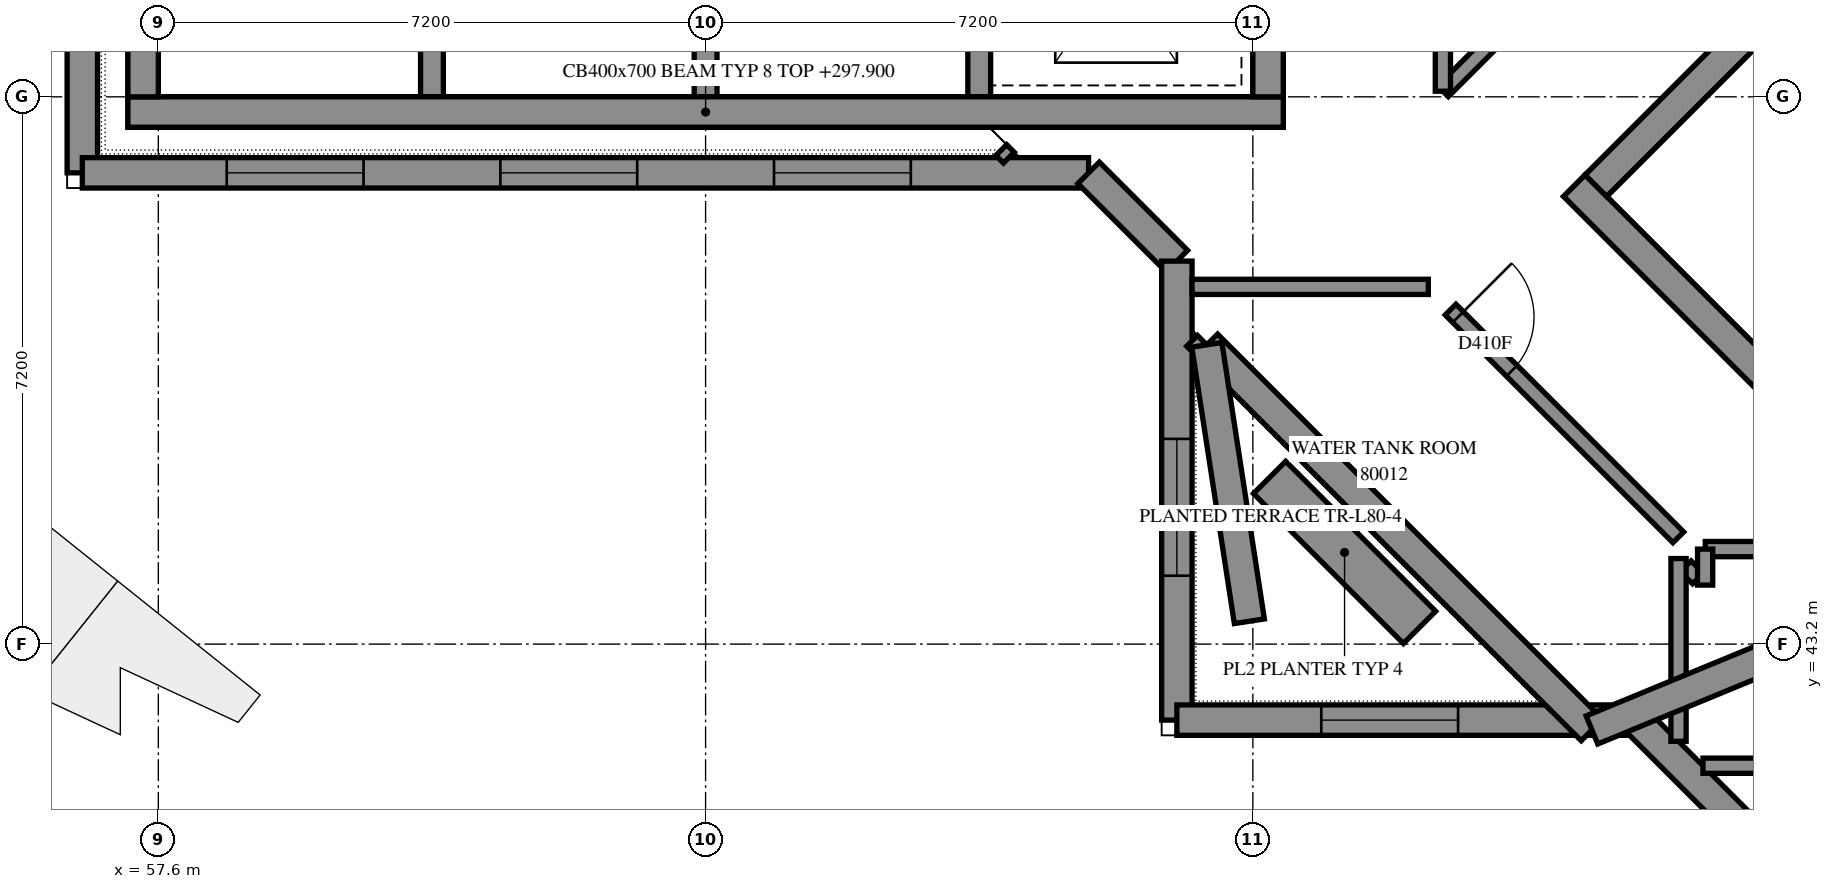
"""IFC4 building model, lengths in metres.
Left out: names, types, materials, properties, quantities, classifications, styles, units other than length and angle.
Written with IfcOpenShell. Run it as: python <this file> out.ifc"""

import sys

from ifc_helpers import new_model, si_unit, direction, frame, frame_2d, origin, place, context, subcontext, project, spatial, polyline, rectangle, outline, extrude, element, fill, save


model = new_model("IFC4")
c1 = context("Model", 3, precision=1e-05, world=origin(), true_north=direction((0.0, 1.0)))
c2 = subcontext(c1, "Body", "Model", "MODEL_VIEW")
j1 = project(units=[si_unit("LENGTHUNIT", "METRE"), si_unit("PLANEANGLEUNIT", "RADIAN")], contexts=[c1])
p1 = place(None, origin())
s1 = spatial("IfcSite", under=j1, at=p1, CompositionType="ELEMENT")
p2 = place(p1, origin())
s2 = spatial("IfcBuilding", under=s1, at=p2, CompositionType="ELEMENT")
p3 = place(p2, frame((0.0, 0.0, 294.4)))
s3 = spatial("IfcBuildingStorey", under=s2, at=p3, CompositionType="ELEMENT", Elevation=294.4)
p4 = place(p3, frame((57.2, 50.2, -0.3), z_axis=(0.0, 0.0, 1.0), x_axis=(1.0, 0.0, 0.0)))
e1 = element("IfcWall", 1, at=p4, inside=s3, PredefinedType="SHEAR", context=c2, shape_type="SweptSolid", body=[
    extrude(outline(polyline([(0.0, 0.0), (15.2, 0.0), (15.2, 3.1), (0.0, 3.1), (0.0, 0.0)])), frame((0.0, 0.2, 0.0), z_axis=(0.0, -1.0, 0.0), x_axis=(1.0, 0.0, 0.0)), (0.0, 0.0, 1.0), 0.4),
])
p5 = place(p3, frame((57.4, 50.4, -0.3), z_axis=(0.0, 0.0, 1.0), x_axis=(0.0, 1.0, 0.0)))
e2 = element("IfcWall", 2, at=p5, inside=s3, PredefinedType="SHEAR", context=c2, shape_type="SweptSolid", body=[
    extrude(outline(polyline([(0.0, 0.0), (14.4, 0.0), (14.4, 3.1), (0.0, 3.1), (0.0, 0.0)])), frame((0.0, 0.2, 0.0), z_axis=(0.0, -1.0, 0.0), x_axis=(1.0, 0.0, 0.0)), (0.0, 0.0, 1.0), 0.4),
])
p6 = place(p5, frame((11.35, 0.0, 0.3)))
e3 = element("IfcOpeningElement", 3, at=p6, cuts=e2, PredefinedType="OPENING", context=c2, shape_type="SweptSolid", body=[
    extrude(rectangle(XDim=1.1, YDim=2.1, at=frame_2d((0.55, 1.05))), frame((0.0, 0.21, 0.0), z_axis=(0.0, -1.0, 0.0), x_axis=(1.0, 0.0, 0.0)), (0.0, 0.0, 1.0), 0.42),
])
p7 = place(p3, frame((72.2, 50.4, -0.3), z_axis=(0.0, 0.0, 1.0), x_axis=(0.0, 1.0, 0.0)))
e4 = element("IfcWall", 4, at=p7, inside=s3, PredefinedType="SHEAR", context=c2, shape_type="SweptSolid", body=[
    extrude(outline(polyline([(0.0, 0.0), (14.4, 0.0), (14.4, 3.1), (0.0, 3.1), (0.0, 0.0)])), frame((0.0, 0.2, 0.0), z_axis=(0.0, -1.0, 0.0), x_axis=(1.0, 0.0, 0.0)), (0.0, 0.0, 1.0), 0.4),
])
p8 = place(p7, frame((4.55, 0.0, 0.3)))
e5 = element("IfcOpeningElement", 5, at=p8, cuts=e4, PredefinedType="OPENING", context=c2, shape_type="SweptSolid", body=[
    extrude(rectangle(XDim=1.1, YDim=2.1, at=frame_2d((0.55, 1.05))), frame((0.0, 0.21, 0.0), z_axis=(0.0, -1.0, 0.0), x_axis=(1.0, 0.0, 0.0)), (0.0, 0.0, 1.0), 0.42),
])
p9 = place(p7, frame((11.35, 0.0, 0.3)))
e6 = element("IfcOpeningElement", 6, at=p9, cuts=e4, PredefinedType="OPENING", context=c2, shape_type="SweptSolid", body=[
    extrude(rectangle(XDim=1.1, YDim=2.1, at=frame_2d((0.55, 1.05))), frame((0.0, 0.21, 0.0), z_axis=(0.0, -1.0, 0.0), x_axis=(1.0, 0.0, 0.0)), (0.0, 0.0, 1.0), 0.42),
])
for number, where, z_axis, x_axis in (
    (7, (61.2, 50.4, 0.0), (0.0, 0.0, 1.0), (0.0, 1.0, 0.0)),
    (8, (64.8, 50.4, 0.0), (0.0, 0.0, 1.0), (0.0, 1.0, 0.0)),
    (9, (68.4, 50.4, 0.0), (0.0, 0.0, 1.0), (0.0, 1.0, 0.0)),
):
    element("IfcWall", number, at=place(p3, frame(where, z_axis=z_axis, x_axis=x_axis)), inside=s3, PredefinedType="SOLIDWALL", context=c2, shape_type="SweptSolid", body=[
        extrude(outline(polyline([(0.0, 0.0), (3.3, 0.0), (3.3, 3.5), (0.0, 3.5), (0.0, 0.0)])), frame((0.0, 0.15, 0.0), z_axis=(0.0, -1.0, 0.0), x_axis=(1.0, 0.0, 0.0)), (0.0, 0.0, 1.0), 0.3),
    ])
p10 = place(p3, frame((76.23, 49.231, -0.3), z_axis=(0.0, 0.0, 1.0), x_axis=(0.7071034917, -0.7071100706, 0.0)))
e10 = element("IfcWall", 10, at=p10, inside=s3, PredefinedType="SHEAR", context=c2, shape_type="SweptSolid", body=[
    extrude(outline(polyline([(0.0, 0.0), (15.2, 0.0), (15.2, 3.1), (0.0, 3.1), (0.0, 0.0)])), frame((0.0, 0.2, 0.0), z_axis=(0.0, -1.0, 0.0), x_axis=(1.0, 0.0, 0.0)), (0.0, 0.0, 1.0), 0.4),
])
p11 = place(p3, frame((76.513, 49.231, -0.3), z_axis=(0.0, 0.0, 1.0), x_axis=(0.7071067812, 0.7071067812, 0.0)))
e11 = element("IfcWall", 11, at=p11, inside=s3, PredefinedType="SHEAR", context=c2, shape_type="SweptSolid", body=[
    extrude(outline(polyline([(0.0, 0.0), (14.4, 0.0), (14.4, 3.1), (0.0, 3.1), (0.0, 0.0)])), frame((0.0, 0.2, 0.0), z_axis=(0.0, -1.0, 0.0), x_axis=(1.0, 0.0, 0.0)), (0.0, 0.0, 1.0), 0.4),
])
p12 = place(p11, frame((4.55, 0.0, 0.3)))
e12 = element("IfcOpeningElement", 12, at=p12, cuts=e11, PredefinedType="OPENING", context=c2, shape_type="SweptSolid", body=[
    extrude(rectangle(XDim=1.1, YDim=2.1, at=frame_2d((0.55, 1.05))), frame((0.0, 0.21, 0.0), z_axis=(0.0, -1.0, 0.0), x_axis=(1.0, 0.0, 0.0)), (0.0, 0.0, 1.0), 0.42),
])
p13 = place(p11, frame((11.35, 0.0, 0.3)))
e13 = element("IfcOpeningElement", 13, at=p13, cuts=e11, PredefinedType="OPENING", context=c2, shape_type="SweptSolid", body=[
    extrude(rectangle(XDim=1.1, YDim=2.1, at=frame_2d((0.55, 1.05))), frame((0.0, 0.21, 0.0), z_axis=(0.0, -1.0, 0.0), x_axis=(1.0, 0.0, 0.0)), (0.0, 0.0, 1.0), 0.42),
])
p14 = place(p3, frame((56.6, 56.6, 0.0), z_axis=(0.0, 0.0, 1.0), x_axis=(0.0, -1.0, 0.0)))
e14 = element("IfcWall", 14, at=p14, inside=s3, PredefinedType="SOLIDWALL", context=c2, shape_type="SweptSolid", body=[
    extrude(outline(polyline([(-0.2, -0.2), (7.4, -0.2), (7.0, 0.2), (-0.2, 0.2), (-0.2, -0.2)])), origin(), (0.0, 0.0, 1.0), 3.5),
])
p15 = place(p14, frame((0.5, 0.0, 0.7)))
e15 = element("IfcOpeningElement", 15, at=p15, cuts=e14, PredefinedType="OPENING", context=c2, shape_type="SweptSolid", body=[
    extrude(rectangle(XDim=1.8, YDim=2.2, at=frame_2d((0.9, 1.1))), frame((0.0, 0.21, 0.0), z_axis=(0.0, -1.0, 0.0), x_axis=(1.0, 0.0, 0.0)), (0.0, 0.0, 1.0), 0.42),
])
p16 = place(p14, frame((3.5, 0.0, 0.7)))
e16 = element("IfcOpeningElement", 16, at=p16, cuts=e14, PredefinedType="OPENING", context=c2, shape_type="SweptSolid", body=[
    extrude(rectangle(XDim=1.8, YDim=2.2, at=frame_2d((0.9, 1.1))), frame((0.0, 0.21, 0.0), z_axis=(0.0, -1.0, 0.0), x_axis=(1.0, 0.0, 0.0)), (0.0, 0.0, 1.0), 0.42),
])
p17 = place(p3, frame((56.6, 49.4, 0.0), z_axis=(0.0, 0.0, 1.0), x_axis=(1.0, 0.0, 0.0)))
e17 = element("IfcWall", 17, at=p17, inside=s3, PredefinedType="SOLIDWALL", context=c2, shape_type="SweptSolid", body=[
    extrude(outline(polyline([(-0.2, -0.2), (13.156, -0.2), (13.322, 0.2), (0.2, 0.2), (-0.2, -0.2)])), origin(), (0.0, 0.0, 1.0), 3.5),
])
p18 = place(p17, frame((1.9, 0.0, 0.7)))
e18 = element("IfcOpeningElement", 18, at=p18, cuts=e17, PredefinedType="OPENING", context=c2, shape_type="SweptSolid", body=[
    extrude(rectangle(XDim=1.8, YDim=2.2, at=frame_2d((0.9, 1.1))), frame((0.0, 0.21, 0.0), z_axis=(0.0, -1.0, 0.0), x_axis=(1.0, 0.0, 0.0)), (0.0, 0.0, 1.0), 0.42),
])
p19 = place(p17, frame((5.5, 0.0, 0.7)))
e19 = element("IfcOpeningElement", 19, at=p19, cuts=e17, PredefinedType="OPENING", context=c2, shape_type="SweptSolid", body=[
    extrude(rectangle(XDim=1.8, YDim=2.2, at=frame_2d((0.9, 1.1))), frame((0.0, 0.21, 0.0), z_axis=(0.0, -1.0, 0.0), x_axis=(1.0, 0.0, 0.0)), (0.0, 0.0, 1.0), 0.42),
])
p20 = place(p17, frame((9.1, 0.0, 0.7)))
e20 = element("IfcOpeningElement", 20, at=p20, cuts=e17, PredefinedType="OPENING", context=c2, shape_type="SweptSolid", body=[
    extrude(rectangle(XDim=1.8, YDim=2.2, at=frame_2d((0.9, 1.1))), frame((0.0, 0.21, 0.0), z_axis=(0.0, -1.0, 0.0), x_axis=(1.0, 0.0, 0.0)), (0.0, 0.0, 1.0), 0.42),
])
p21 = place(p3, frame((69.839, 49.4, 0.0), z_axis=(0.0, 0.0, 1.0), x_axis=(0.7071067812, -0.7071067812, 0.0)))
e21 = element("IfcWall", 21, at=p21, inside=s3, PredefinedType="SOLIDWALL", context=c2, shape_type="SweptSolid", body=[
    extrude(outline(polyline([(0.083, -0.2), (1.559, -0.2), (1.725, 0.2), (-0.083, 0.2), (0.083, -0.2)])), origin(), (0.0, 0.0, 1.0), 3.5),
])
p22 = place(p3, frame((71.0, 48.239, 0.0), z_axis=(0.0, 0.0, 1.0), x_axis=(0.0, -1.0, 0.0)))
e22 = element("IfcWall", 22, at=p22, inside=s3, PredefinedType="SOLIDWALL", context=c2, shape_type="SweptSolid", body=[
    extrude(outline(polyline([(0.083, -0.2), (6.239, -0.2), (5.839, 0.2), (-0.083, 0.2), (0.083, -0.2)])), origin(), (0.0, 0.0, 1.0), 3.5),
])
p23 = place(p22, frame((2.339, 0.0, 0.7)))
e23 = element("IfcOpeningElement", 23, at=p23, cuts=e22, PredefinedType="OPENING", context=c2, shape_type="SweptSolid", body=[
    extrude(rectangle(XDim=1.8, YDim=2.2, at=frame_2d((0.9, 1.1))), frame((0.0, 0.21, 0.0), z_axis=(0.0, -1.0, 0.0), x_axis=(1.0, 0.0, 0.0)), (0.0, 0.0, 1.0), 0.42),
])
p24 = place(p3, frame((71.0, 42.2, 0.0), z_axis=(0.0, 0.0, 1.0), x_axis=(1.0, 0.0, 0.0)))
e24 = element("IfcWall", 24, at=p24, inside=s3, PredefinedType="SOLIDWALL", context=c2, shape_type="SweptSolid", body=[
    extrude(outline(polyline([(-0.2, -0.2), (5.956, -0.2), (6.122, 0.2), (0.2, 0.2), (-0.2, -0.2)])), origin(), (0.0, 0.0, 1.0), 3.5),
])
p25 = place(p24, frame((1.9, 0.0, 0.7)))
e25 = element("IfcOpeningElement", 25, at=p25, cuts=e24, PredefinedType="OPENING", context=c2, shape_type="SweptSolid", body=[
    extrude(rectangle(XDim=1.8, YDim=2.2, at=frame_2d((0.9, 1.1))), frame((0.0, 0.21, 0.0), z_axis=(0.0, -1.0, 0.0), x_axis=(1.0, 0.0, 0.0)), (0.0, 0.0, 1.0), 0.42),
])
p26 = place(p3, frame((77.039, 42.2, 0.0), z_axis=(0.0, 0.0, 1.0), x_axis=(0.7071067812, -0.7071067812, 0.0)))
e26 = element("IfcWall", 26, at=p26, inside=s3, PredefinedType="SOLIDWALL", context=c2, shape_type="SweptSolid", body=[
    extrude(outline(polyline([(0.083, -0.2), (17.656, -0.2), (17.256, 0.2), (-0.083, 0.2), (0.083, -0.2)])), origin(), (0.0, 0.0, 1.0), 3.5),
])
p27 = place(p26, frame((2.857, 0.0, 0.7)))
e27 = element("IfcOpeningElement", 27, at=p27, cuts=e26, PredefinedType="OPENING", context=c2, shape_type="SweptSolid", body=[
    extrude(rectangle(XDim=1.8, YDim=2.2, at=frame_2d((0.9, 1.1))), frame((0.0, 0.21, 0.0), z_axis=(0.0, -1.0, 0.0), x_axis=(1.0, 0.0, 0.0)), (0.0, 0.0, 1.0), 0.42),
])
p28 = place(p26, frame((6.556, 0.0, 0.7)))
e28 = element("IfcOpeningElement", 28, at=p28, cuts=e26, PredefinedType="OPENING", context=c2, shape_type="SweptSolid", body=[
    extrude(rectangle(XDim=1.8, YDim=2.2, at=frame_2d((0.9, 1.1))), frame((0.0, 0.21, 0.0), z_axis=(0.0, -1.0, 0.0), x_axis=(1.0, 0.0, 0.0)), (0.0, 0.0, 1.0), 0.42),
])
p29 = place(p26, frame((10.156, 0.0, 0.7)))
e29 = element("IfcOpeningElement", 29, at=p29, cuts=e26, PredefinedType="OPENING", context=c2, shape_type="SweptSolid", body=[
    extrude(rectangle(XDim=1.8, YDim=2.2, at=frame_2d((0.9, 1.1))), frame((0.0, 0.21, 0.0), z_axis=(0.0, -1.0, 0.0), x_axis=(1.0, 0.0, 0.0)), (0.0, 0.0, 1.0), 0.42),
])
p30 = place(p26, frame((13.757, 0.0, 0.7)))
e30 = element("IfcOpeningElement", 30, at=p30, cuts=e26, PredefinedType="OPENING", context=c2, shape_type="SweptSolid", body=[
    extrude(rectangle(XDim=1.8, YDim=2.2, at=frame_2d((0.9, 1.1))), frame((0.0, 0.21, 0.0), z_axis=(0.0, -1.0, 0.0), x_axis=(1.0, 0.0, 0.0)), (0.0, 0.0, 1.0), 0.42),
])
p31 = place(p3, frame((68.79, 49.6, 0.0), z_axis=(0.0, 0.0, 1.0), x_axis=(-0.7071067812, 0.7071067812, 0.0)))
e31 = element("IfcWall", 31, at=p31, inside=s3, PredefinedType="PARAPET", context=c2, shape_type="SweptSolid", body=[
    extrude(outline(polyline([(0.0, -0.1), (0.141, -0.1), (0.141, 0.1), (0.0, 0.1), (0.0, -0.1)])), origin(), (0.0, 0.0, 1.0), 0.25),
])
p32 = place(p3, frame((75.99, 42.4, 0.0), z_axis=(0.0, 0.0, 1.0), x_axis=(-0.7071067812, 0.7071067812, 0.0)))
e32 = element("IfcWall", 32, at=p32, inside=s3, PredefinedType="PARAPET", context=c2, shape_type="SweptSolid", body=[
    extrude(outline(polyline([(0.0, -0.1), (6.774, -0.1), (6.774, 0.1), (0.0, 0.1), (0.0, -0.1)])), origin(), (0.0, 0.0, 1.0), 0.25),
])
p33 = place(p3, frame((74.601, 47.601, 0.0), z_axis=(0.0, 0.0, 1.0), x_axis=(0.7071067812, -0.7071067812, 0.0)))
e33 = element("IfcWall", 33, at=p33, inside=s3, PredefinedType="PARTITIONING", context=c2, shape_type="SweptSolid", body=[
    extrude(rectangle(XDim=4.237, YDim=0.2, at=frame_2d((2.119, 0.0))), origin(), (0.0, 0.0, 1.0), 3.5),
])
p34 = place(p33, frame((0.139, 0.0, 0.0)))
e34 = element("IfcOpeningElement", 34, at=p34, cuts=e33, PredefinedType="OPENING", context=c2, shape_type="SweptSolid", body=[
    extrude(rectangle(XDim=1.0, YDim=2.1, at=frame_2d((0.5, 1.05))), frame((0.0, 0.11, 0.0), z_axis=(0.0, -1.0, 0.0), x_axis=(1.0, 0.0, 0.0)), (0.0, 0.0, 1.0), 0.22),
])
p35 = place(p3, frame((74.501, 50.473, 0.0), z_axis=(0.0, 0.0, 1.0), x_axis=(0.7071067812, 0.7071067812, 0.0)))
e35 = element("IfcWall", 35, at=p35, inside=s3, PredefinedType="PARTITIONING", context=c2, shape_type="SweptSolid", body=[
    extrude(rectangle(XDim=3.502, YDim=0.2, at=frame_2d((1.751, 0.0))), origin(), (0.0, 0.0, 1.0), 3.5),
])
p36 = place(p3, frame((77.952, 44.45, 0.0), z_axis=(0.0, 0.0, 1.0), x_axis=(1.0, 0.0, 0.0)))
e36 = element("IfcWall", 36, at=p36, inside=s3, PredefinedType="PARTITIONING", context=c2, shape_type="SweptSolid", body=[
    extrude(rectangle(XDim=2.498, YDim=0.2, at=frame_2d((1.249, 0.0))), origin(), (0.0, 0.0, 1.0), 3.5),
])
p37 = place(p3, frame((74.5, 50.474, 0.0), z_axis=(0.0, 0.0, 1.0), x_axis=(0.0, 1.0, 0.0)))
e37 = element("IfcWall", 37, at=p37, inside=s3, PredefinedType="PARTITIONING", context=c2, shape_type="SweptSolid", body=[
    extrude(rectangle(XDim=2.476, YDim=0.2, at=frame_2d((1.238, 0.0))), origin(), (0.0, 0.0, 1.0), 3.5),
])
p38 = place(p3, frame((77.696, 44.224, 0.0), z_axis=(0.0, 0.0, 1.0), x_axis=(0.7071067812, -0.7071067812, 0.0)))
e38 = element("IfcWall", 38, at=p38, inside=s3, PredefinedType="PARTITIONING", context=c2, shape_type="SweptSolid", body=[
    extrude(rectangle(XDim=0.225, YDim=0.2, at=frame_2d((0.113, 0.0))), origin(), (0.0, 0.0, 1.0), 3.5),
])
p39 = place(p3, frame((77.95, 43.976, 0.0), z_axis=(0.0, 0.0, 1.0), x_axis=(0.0, 1.0, 0.0)))
e39 = element("IfcWall", 39, at=p39, inside=s3, PredefinedType="PARTITIONING", context=c2, shape_type="SweptSolid", body=[
    extrude(rectangle(XDim=0.474, YDim=0.2, at=frame_2d((0.237, 0.0))), origin(), (0.0, 0.0, 1.0), 3.5),
])
p40 = place(p3, frame((74.192, 43.42, 0.0), z_axis=(0.0, 0.0, 1.0), x_axis=(-0.7071067812, 0.7071067812, 0.0)))
e40 = element("IfcWall", 40, at=p40, inside=s3, PredefinedType="SOLIDWALL", context=c2, shape_type="SweptSolid", body=[
    extrude(outline(polyline([(0.0, -0.3), (2.789, -0.3), (2.789, 0.3), (0.0, 0.3), (0.0, -0.3)])), origin(), (0.0, 0.0, 1.0), 0.65),
])
p41 = place(p3, frame((71.2, 47.9, 0.0), z_axis=(0.0, 0.0, 1.0), x_axis=(1.0, 0.0, 0.0)))
e41 = element("IfcWall", 41, at=p41, inside=s3, PredefinedType="PARTITIONING", context=c2, shape_type="SweptSolid", body=[
    extrude(outline(polyline([(0.0, -0.1), (3.108, -0.1), (3.108, 0.1), (0.0, 0.1), (0.0, -0.1)])), origin(), (0.0, 0.0, 1.0), 3.5),
])
for number, where, z_axis, x_axis in (
    (42, (77.6, 41.922, 0.0), (0.0, 0.0, 1.0), (0.0, 1.0, 0.0)),
    (43, (77.922, 41.6, 0.0), (0.0, 0.0, 1.0), (1.0, 0.0, 0.0)),
):
    element("IfcWall", number, at=place(p3, frame(where, z_axis=z_axis, x_axis=x_axis)), inside=s3, PredefinedType="PARTITIONING", context=c2, shape_type="SweptSolid", body=[
        extrude(outline(polyline([(0.0, -0.1), (2.404, -0.1), (2.404, 0.1), (0.0, 0.1), (0.0, -0.1)])), origin(), (0.0, 0.0, 1.0), 3.5),
    ])
p42 = place(p18, origin())
e44 = element("IfcWindow", 44, at=p42, inside=s3, PartitioningType="SINGLE_PANEL", PredefinedType="WINDOW", context=c2, shape_type="SweptSolid", body=[
    extrude(rectangle(XDim=1.8, YDim=2.2, at=frame_2d((0.9, 1.1))), frame((0.0, 0.08, 0.0), z_axis=(0.0, -1.0, 0.0), x_axis=(1.0, 0.0, 0.0)), (0.0, 0.0, 1.0), 0.06),
])
fill(e18, e44)
p43 = place(p19, origin())
e45 = element("IfcWindow", 45, at=p43, inside=s3, PartitioningType="SINGLE_PANEL", PredefinedType="WINDOW", context=c2, shape_type="SweptSolid", body=[
    extrude(rectangle(XDim=1.8, YDim=2.2, at=frame_2d((0.9, 1.1))), frame((0.0, 0.08, 0.0), z_axis=(0.0, -1.0, 0.0), x_axis=(1.0, 0.0, 0.0)), (0.0, 0.0, 1.0), 0.06),
])
fill(e19, e45)
p44 = place(p20, origin())
e46 = element("IfcWindow", 46, at=p44, inside=s3, PartitioningType="SINGLE_PANEL", PredefinedType="WINDOW", context=c2, shape_type="SweptSolid", body=[
    extrude(rectangle(XDim=1.8, YDim=2.2, at=frame_2d((0.9, 1.1))), frame((0.0, 0.08, 0.0), z_axis=(0.0, -1.0, 0.0), x_axis=(1.0, 0.0, 0.0)), (0.0, 0.0, 1.0), 0.06),
])
fill(e20, e46)
p45 = place(p23, origin())
e47 = element("IfcWindow", 47, at=p45, inside=s3, PartitioningType="SINGLE_PANEL", PredefinedType="WINDOW", context=c2, shape_type="SweptSolid", body=[
    extrude(rectangle(XDim=1.8, YDim=2.2, at=frame_2d((0.9, 1.1))), frame((0.0, 0.08, 0.0), z_axis=(0.0, -1.0, 0.0), x_axis=(1.0, 0.0, 0.0)), (0.0, 0.0, 1.0), 0.06),
])
fill(e23, e47)
p46 = place(p25, origin())
e48 = element("IfcWindow", 48, at=p46, inside=s3, PartitioningType="SINGLE_PANEL", PredefinedType="WINDOW", context=c2, shape_type="SweptSolid", body=[
    extrude(rectangle(XDim=1.8, YDim=2.2, at=frame_2d((0.9, 1.1))), frame((0.0, 0.08, 0.0), z_axis=(0.0, -1.0, 0.0), x_axis=(1.0, 0.0, 0.0)), (0.0, 0.0, 1.0), 0.06),
])
fill(e25, e48)
p47 = place(p34, origin())
e49 = element("IfcDoor", 49, at=p47, inside=s3, OperationType="SINGLE_SWING_LEFT", PredefinedType="DOOR", context=c2, shape_type="SweptSolid", body=[
    extrude(rectangle(XDim=1.0, YDim=2.1, at=frame_2d((0.5, 1.05))), frame((0.0, 0.025, 0.0), z_axis=(0.0, -1.0, 0.0), x_axis=(1.0, 0.0, 0.0)), (0.0, 0.0, 1.0), 0.05),
])
fill(e34, e49)
save(model, sys.argv[1])
